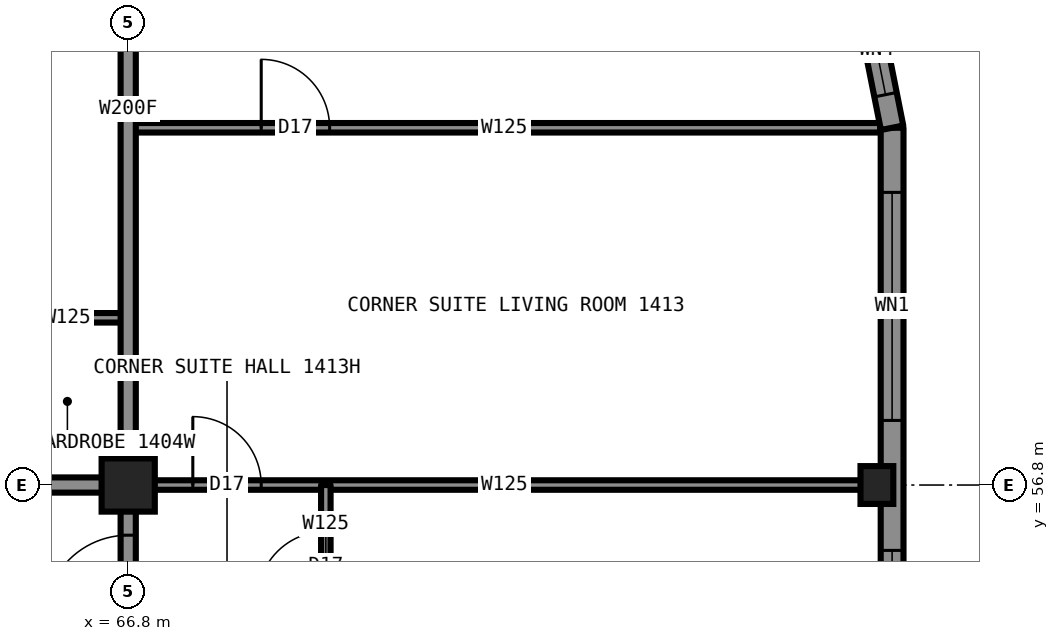
"""IFC4 building model, lengths in metres.
Left out: names, types, materials, properties, quantities, classifications, styles, units other than length and angle.
Written with IfcOpenShell. Run it as: python <this file> out.ifc"""

import sys

from ifc_helpers import new_model, si_unit, direction, frame, frame_2d, origin, origin_2d, place, context, subcontext, project, spatial, rectangle, hollow_rectangle, i_section, extrude, element, fill, save


model = new_model("IFC4")
c1 = context("Model", 3, precision=1e-05, world=origin(), true_north=direction((0.0, 1.0)))
c2 = subcontext(c1, "Body", "Model", "MODEL_VIEW")
j1 = project(units=[si_unit("LENGTHUNIT", "METRE"), si_unit("PLANEANGLEUNIT", "RADIAN")], contexts=[c1])
p1 = place(None, origin())
s1 = spatial("IfcSite", under=j1, at=p1, CompositionType="ELEMENT")
p2 = place(p1, origin())
s2 = spatial("IfcBuilding", under=s1, at=p2, CompositionType="ELEMENT")
p3 = place(p2, frame((0.0, 0.0, 49.5)))
s3 = spatial("IfcBuildingStorey", under=s2, at=p3, CompositionType="ELEMENT", Elevation=49.5)
p4 = place(p3, frame((76.65, 56.8, 0.0), z_axis=(0.0, 0.0, 1.0), x_axis=(1.0, 0.0, 0.0)))
e1 = element("IfcColumn", 1, at=p4, inside=s3, PredefinedType="COLUMN", context=c2, shape_type="SweptSolid", body=[
    extrude(i_section(OverallWidth=0.432, OverallDepth=0.498, WebThickness=0.056, FlangeThickness=0.089, at=origin_2d()), origin(), (0.0, 0.0, 1.0), 3.5),
])
p5 = place(p3, frame((66.8, 56.8, 0.0), z_axis=(0.0, 0.0, 1.0), x_axis=(1.0, 0.0, 0.0)))
e2 = element("IfcColumn", 2, at=p5, inside=s3, PredefinedType="COLUMN", context=c2, shape_type="SweptSolid", body=[
    extrude(hollow_rectangle(XDim=0.7, YDim=0.7, WallThickness=0.06, at=origin_2d()), origin(), (0.0, 0.0, 1.0), 3.5),
])
p6 = place(p3, frame((43.2, 56.8, 0.0), z_axis=(0.0, 0.0, 1.0), x_axis=(1.0, 0.0, 0.0)))
e3 = element("IfcWall", 3, at=p6, inside=s3, PredefinedType="PARTITIONING", context=c2, shape_type="SweptSolid", body=[
    extrude(rectangle(XDim=23.6, YDim=0.2, at=frame_2d((11.8, 0.0))), origin(), (0.0, 0.0, 1.0), 3.33),
])
p7 = place(p6, frame((1.46, 0.0, 0.0)))
e4 = element("IfcOpeningElement", 4, at=p7, cuts=e3, PredefinedType="OPENING", context=c2, shape_type="SweptSolid", body=[
    extrude(rectangle(XDim=1.0, YDim=2.2, at=frame_2d((0.5, 1.1))), frame((0.0, 0.11, 0.0), z_axis=(0.0, -1.0, 0.0), x_axis=(1.0, 0.0, 0.0)), (0.0, 0.0, 1.0), 0.22),
])
p8 = place(p6, frame((7.27, 0.0, 0.0)))
e5 = element("IfcOpeningElement", 5, at=p8, cuts=e3, PredefinedType="OPENING", context=c2, shape_type="SweptSolid", body=[
    extrude(rectangle(XDim=1.0, YDim=2.2, at=frame_2d((0.5, 1.1))), frame((0.0, 0.11, 0.0), z_axis=(0.0, -1.0, 0.0), x_axis=(1.0, 0.0, 0.0)), (0.0, 0.0, 1.0), 0.22),
])
p9 = place(p6, frame((11.7, 0.0, 0.0)))
e6 = element("IfcOpeningElement", 6, at=p9, cuts=e3, PredefinedType="OPENING", context=c2, shape_type="SweptSolid", body=[
    extrude(rectangle(XDim=1.0, YDim=2.2, at=frame_2d((0.5, 1.1))), frame((0.0, 0.11, 0.0), z_axis=(0.0, -1.0, 0.0), x_axis=(1.0, 0.0, 0.0)), (0.0, 0.0, 1.0), 0.22),
])
p10 = place(p6, frame((17.16, 0.0, 0.0)))
e7 = element("IfcOpeningElement", 7, at=p10, cuts=e3, PredefinedType="OPENING", context=c2, shape_type="SweptSolid", body=[
    extrude(rectangle(XDim=1.0, YDim=2.2, at=frame_2d((0.5, 1.1))), frame((0.0, 0.11, 0.0), z_axis=(0.0, -1.0, 0.0), x_axis=(1.0, 0.0, 0.0)), (0.0, 0.0, 1.0), 0.22),
])
p11 = place(p3, frame((66.8, 56.8, 0.0), z_axis=(0.0, 0.0, 1.0), x_axis=(1.0, 0.0, 0.0)))
e8 = element("IfcWall", 8, at=p11, inside=s3, PredefinedType="PARTITIONING", context=c2, shape_type="SweptSolid", body=[
    extrude(rectangle(XDim=9.9, YDim=0.125, at=frame_2d((4.95, 0.0))), origin(), (0.0, 0.0, 1.0), 2.573),
])
p12 = place(p11, frame((0.85, 0.0, 0.0)))
e9 = element("IfcOpeningElement", 9, at=p12, cuts=e8, PredefinedType="OPENING", context=c2, shape_type="SweptSolid", body=[
    extrude(rectangle(XDim=0.9, YDim=2.2, at=frame_2d((0.45, 1.1))), frame((0.0, 0.073, 0.0), z_axis=(0.0, -1.0, 0.0), x_axis=(1.0, 0.0, 0.0)), (0.0, 0.0, 1.0), 0.145),
])
p13 = place(p3, frame((65.2, 59.0, 0.0), z_axis=(0.0, 0.0, 1.0), x_axis=(1.0, 0.0, 0.0)))
e10 = element("IfcWall", 10, at=p13, inside=s3, PredefinedType="PARTITIONING", context=c2, shape_type="SweptSolid", body=[
    extrude(rectangle(XDim=1.6, YDim=0.125, at=frame_2d((0.8, 0.0))), origin(), (0.0, 0.0, 1.0), 3.33),
])
p14 = place(p3, frame((66.8, 61.5, 0.0), z_axis=(0.0, 0.0, 1.0), x_axis=(1.0, 0.0, 0.0)))
e11 = element("IfcWall", 11, at=p14, inside=s3, PredefinedType="PARTITIONING", context=c2, shape_type="SweptSolid", body=[
    extrude(rectangle(XDim=9.894, YDim=0.125, at=frame_2d((4.947, 0.0))), origin(), (0.0, 0.0, 1.0), 3.33),
])
p15 = place(p14, frame((1.75, 0.0, 0.0)))
e12 = element("IfcOpeningElement", 12, at=p15, cuts=e11, PredefinedType="OPENING", context=c2, shape_type="SweptSolid", body=[
    extrude(rectangle(XDim=0.9, YDim=2.2, at=frame_2d((0.45, 1.1))), frame((0.0, 0.073, 0.0), z_axis=(0.0, -1.0, 0.0), x_axis=(1.0, 0.0, 0.0)), (0.0, 0.0, 1.0), 0.145),
])
p16 = place(p3, frame((66.8, 52.08, 0.0), z_axis=(0.0, 0.0, 1.0), x_axis=(0.0, 1.0, 0.0)))
e13 = element("IfcWall", 13, at=p16, inside=s3, PredefinedType="PARTITIONING", context=c2, shape_type="SweptSolid", body=[
    extrude(rectangle(XDim=4.72, YDim=0.2, at=frame_2d((2.36, 0.0))), origin(), (0.0, 0.0, 1.0), 3.33),
])
p17 = place(p16, frame((2.96, 0.0, 0.0)))
e14 = element("IfcOpeningElement", 14, at=p17, cuts=e13, PredefinedType="OPENING", context=c2, shape_type="SweptSolid", body=[
    extrude(rectangle(XDim=1.1, YDim=2.2, at=frame_2d((0.55, 1.1))), frame((0.0, 0.11, 0.0), z_axis=(0.0, -1.0, 0.0), x_axis=(1.0, 0.0, 0.0)), (0.0, 0.0, 1.0), 0.22),
])
p18 = place(p3, frame((66.8, 56.8, 0.0), z_axis=(0.0, 0.0, 1.0), x_axis=(0.0, 1.0, 0.0)))
e15 = element("IfcWall", 15, at=p18, inside=s3, PredefinedType="PARTITIONING", context=c2, shape_type="SweptSolid", body=[
    extrude(rectangle(XDim=9.9, YDim=0.2, at=frame_2d((4.95, 0.0))), origin(), (0.0, 0.0, 1.0), 2.573),
])
p19 = place(p3, frame((69.4, 54.68, 0.0), z_axis=(0.0, 0.0, 1.0), x_axis=(0.0, 1.0, 0.0)))
e16 = element("IfcWall", 16, at=p19, inside=s3, PredefinedType="PARTITIONING", context=c2, shape_type="SweptSolid", body=[
    extrude(rectangle(XDim=2.12, YDim=0.125, at=frame_2d((1.06, 0.0))), origin(), (0.0, 0.0, 1.0), 3.33),
])
p20 = place(p19, frame((0.61, 0.0, 0.0)))
e17 = element("IfcOpeningElement", 17, at=p20, cuts=e16, PredefinedType="OPENING", context=c2, shape_type="SweptSolid", body=[
    extrude(rectangle(XDim=0.9, YDim=2.2, at=frame_2d((0.45, 1.1))), frame((0.0, 0.073, 0.0), z_axis=(0.0, -1.0, 0.0), x_axis=(1.0, 0.0, 0.0)), (0.0, 0.0, 1.0), 0.145),
])
p21 = place(p3, frame((76.85, 28.5, 0.0), z_axis=(0.0, 0.0, 1.0), x_axis=(0.0, 1.0, 0.0)))
e18 = element("IfcWall", 18, at=p21, inside=s3, PredefinedType="SOLIDWALL", context=c2, shape_type="SweptSolid", body=[
    extrude(rectangle(XDim=33.0, YDim=0.3, at=frame_2d((16.5, 0.0))), origin(), (0.0, 0.0, 1.0), 2.83),
])
p22 = place(p21, frame((0.85, 0.0, 0.5)))
e19 = element("IfcOpeningElement", 19, at=p22, cuts=e18, PredefinedType="OPENING", context=c2, shape_type="SweptSolid", body=[
    extrude(rectangle(XDim=3.0, YDim=2.0, at=frame_2d((1.5, 1.0))), frame((0.0, 0.16, 0.0), z_axis=(0.0, -1.0, 0.0), x_axis=(1.0, 0.0, 0.0)), (0.0, 0.0, 1.0), 0.32),
])
p23 = place(p21, frame((5.56, 0.0, 0.5)))
e20 = element("IfcOpeningElement", 20, at=p23, cuts=e18, PredefinedType="OPENING", context=c2, shape_type="SweptSolid", body=[
    extrude(rectangle(XDim=3.0, YDim=2.0, at=frame_2d((1.5, 1.0))), frame((0.0, 0.16, 0.0), z_axis=(0.0, -1.0, 0.0), x_axis=(1.0, 0.0, 0.0)), (0.0, 0.0, 1.0), 0.32),
])
p24 = place(p21, frame((10.28, 0.0, 1.1)))
e21 = element("IfcOpeningElement", 21, at=p24, cuts=e18, PredefinedType="OPENING", context=c2, shape_type="SweptSolid", body=[
    extrude(rectangle(XDim=1.1, YDim=1.4, at=frame_2d((0.55, 0.7))), frame((0.0, 0.16, 0.0), z_axis=(0.0, -1.0, 0.0), x_axis=(1.0, 0.0, 0.0)), (0.0, 0.0, 1.0), 0.32),
])
p25 = place(p21, frame((15.0, 0.0, 0.5)))
e22 = element("IfcOpeningElement", 22, at=p25, cuts=e18, PredefinedType="OPENING", context=c2, shape_type="SweptSolid", body=[
    extrude(rectangle(XDim=3.0, YDim=2.0, at=frame_2d((1.5, 1.0))), frame((0.0, 0.16, 0.0), z_axis=(0.0, -1.0, 0.0), x_axis=(1.0, 0.0, 0.0)), (0.0, 0.0, 1.0), 0.32),
])
p26 = place(p21, frame((21.62, 0.0, 1.1)))
e23 = element("IfcOpeningElement", 23, at=p26, cuts=e18, PredefinedType="OPENING", context=c2, shape_type="SweptSolid", body=[
    extrude(rectangle(XDim=1.1, YDim=1.4, at=frame_2d((0.55, 0.7))), frame((0.0, 0.16, 0.0), z_axis=(0.0, -1.0, 0.0), x_axis=(1.0, 0.0, 0.0)), (0.0, 0.0, 1.0), 0.32),
])
p27 = place(p21, frame((24.44, 0.0, 0.5)))
e24 = element("IfcOpeningElement", 24, at=p27, cuts=e18, PredefinedType="OPENING", context=c2, shape_type="SweptSolid", body=[
    extrude(rectangle(XDim=3.0, YDim=2.0, at=frame_2d((1.5, 1.0))), frame((0.0, 0.16, 0.0), z_axis=(0.0, -1.0, 0.0), x_axis=(1.0, 0.0, 0.0)), (0.0, 0.0, 1.0), 0.32),
])
p28 = place(p21, frame((29.15, 0.0, 0.5)))
e25 = element("IfcOpeningElement", 25, at=p28, cuts=e18, PredefinedType="OPENING", context=c2, shape_type="SweptSolid", body=[
    extrude(rectangle(XDim=3.0, YDim=2.0, at=frame_2d((1.5, 1.0))), frame((0.0, 0.16, 0.0), z_axis=(0.0, -1.0, 0.0), x_axis=(1.0, 0.0, 0.0)), (0.0, 0.0, 1.0), 0.32),
])
p29 = place(p3, frame((76.85, 61.5, 0.0), z_axis=(0.0, 0.0, 1.0), x_axis=(-0.195081421501, 0.980787050784, 0.0)))
e26 = element("IfcWall", 26, at=p29, inside=s3, PredefinedType="SOLIDWALL", context=c2, shape_type="SweptSolid", body=[
    extrude(rectangle(XDim=2.087, YDim=0.3, at=frame_2d((1.044, 0.0))), origin(), (0.0, 0.0, 1.0), 3.33),
])
p30 = place(p29, frame((0.444, 0.0, 0.5)))
e27 = element("IfcOpeningElement", 27, at=p30, cuts=e26, PredefinedType="OPENING", context=c2, shape_type="SweptSolid", body=[
    extrude(rectangle(XDim=1.2, YDim=2.0, at=frame_2d((0.6, 1.0))), frame((0.0, 0.16, 0.0), z_axis=(0.0, -1.0, 0.0), x_axis=(1.0, 0.0, 0.0)), (0.0, 0.0, 1.0), 0.32),
])
p31 = place(p12, origin())
e28 = element("IfcDoor", 28, at=p31, inside=s3, OperationType="SINGLE_SWING_LEFT", PredefinedType="DOOR", context=c2, shape_type="SweptSolid", body=[
    extrude(rectangle(XDim=0.9, YDim=2.2, at=frame_2d((0.45, 1.1))), frame((0.0, 0.025, 0.0), z_axis=(0.0, -1.0, 0.0), x_axis=(1.0, 0.0, 0.0)), (0.0, 0.0, 1.0), 0.05),
])
fill(e9, e28)
p32 = place(p17, origin())
e29 = element("IfcDoor", 29, at=p32, inside=s3, OperationType="SINGLE_SWING_LEFT", PredefinedType="DOOR", context=c2, shape_type="SweptSolid", body=[
    extrude(rectangle(XDim=1.1, YDim=2.2, at=frame_2d((0.55, 1.1))), frame((0.0, 0.025, 0.0), z_axis=(0.0, -1.0, 0.0), x_axis=(1.0, 0.0, 0.0)), (0.0, 0.0, 1.0), 0.05),
])
fill(e14, e29)
p33 = place(p15, origin())
e30 = element("IfcDoor", 30, at=p33, inside=s3, OperationType="SINGLE_SWING_LEFT", PredefinedType="DOOR", context=c2, shape_type="SweptSolid", body=[
    extrude(rectangle(XDim=0.9, YDim=2.2, at=frame_2d((0.45, 1.1))), frame((0.0, 0.025, 0.0), z_axis=(0.0, -1.0, 0.0), x_axis=(1.0, 0.0, 0.0)), (0.0, 0.0, 1.0), 0.05),
])
fill(e12, e30)
p34 = place(p20, origin())
e31 = element("IfcDoor", 31, at=p34, inside=s3, OperationType="SINGLE_SWING_LEFT", PredefinedType="DOOR", context=c2, shape_type="SweptSolid", body=[
    extrude(rectangle(XDim=0.9, YDim=2.2, at=frame_2d((0.45, 1.1))), frame((0.0, 0.025, 0.0), z_axis=(0.0, -1.0, 0.0), x_axis=(1.0, 0.0, 0.0)), (0.0, 0.0, 1.0), 0.05),
])
fill(e17, e31)
p35 = place(p27, origin())
e32 = element("IfcWindow", 32, at=p35, inside=s3, PartitioningType="SINGLE_PANEL", PredefinedType="WINDOW", context=c2, shape_type="SweptSolid", body=[
    extrude(rectangle(XDim=3.0, YDim=2.0, at=frame_2d((1.5, 1.0))), frame((0.0, 0.03, 0.0), z_axis=(0.0, -1.0, 0.0), x_axis=(1.0, 0.0, 0.0)), (0.0, 0.0, 1.0), 0.06),
])
fill(e24, e32)
p36 = place(p28, origin())
e33 = element("IfcWindow", 33, at=p36, inside=s3, PartitioningType="SINGLE_PANEL", PredefinedType="WINDOW", context=c2, shape_type="SweptSolid", body=[
    extrude(rectangle(XDim=3.0, YDim=2.0, at=frame_2d((1.5, 1.0))), frame((0.0, 0.03, 0.0), z_axis=(0.0, -1.0, 0.0), x_axis=(1.0, 0.0, 0.0)), (0.0, 0.0, 1.0), 0.06),
])
fill(e25, e33)
p37 = place(p30, origin())
e34 = element("IfcWindow", 34, at=p37, inside=s3, PartitioningType="SINGLE_PANEL", PredefinedType="WINDOW", context=c2, shape_type="SweptSolid", body=[
    extrude(rectangle(XDim=1.2, YDim=2.0, at=frame_2d((0.6, 1.0))), frame((0.0, 0.03, 0.0), z_axis=(0.0, -1.0, 0.0), x_axis=(1.0, 0.0, 0.0)), (0.0, 0.0, 1.0), 0.06),
])
fill(e27, e34)
save(model, sys.argv[1])
